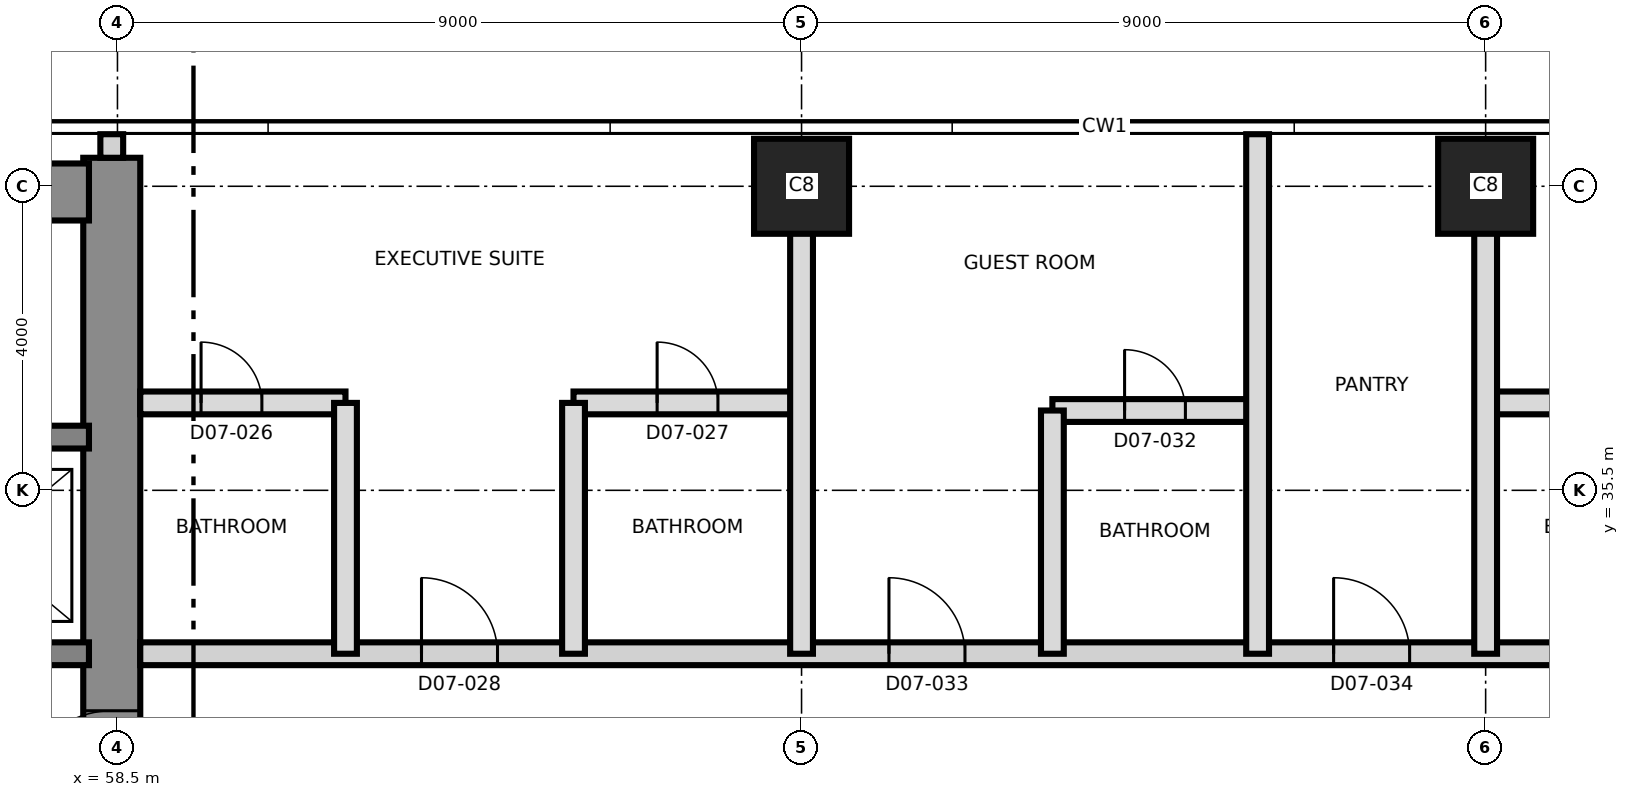
"""IFC4 building model, lengths in metres.
Left out: names, types, materials, properties, quantities, classifications, styles, units other than length and angle.
Written with IfcOpenShell. Run it as: python <this file> out.ifc"""

import sys

from ifc_helpers import new_model, si_unit, direction, frame, frame_2d, origin, origin_2d, place, context, subcontext, project, spatial, rectangle, extrude, element, fill, save


model = new_model("IFC4")
c1 = context("Model", 3, precision=1e-05, world=origin(), true_north=direction((0.0, 1.0)))
c2 = subcontext(c1, "Body", "Model", "MODEL_VIEW")
j1 = project(units=[si_unit("LENGTHUNIT", "METRE"), si_unit("PLANEANGLEUNIT", "RADIAN")], contexts=[c1])
p1 = place(None, origin())
s1 = spatial("IfcSite", under=j1, at=p1, CompositionType="ELEMENT")
p2 = place(p1, origin())
s2 = spatial("IfcBuilding", under=s1, at=p2, CompositionType="ELEMENT")
p3 = place(p2, frame((0.0, 0.0, 94.5)))
s3 = spatial("IfcBuildingStorey", under=s2, at=p3, CompositionType="ELEMENT", Elevation=94.5)
p4 = place(p3, frame((58.425, 21.125, 0.0), z_axis=(0.0, 0.0, 1.0), x_axis=(0.0, 1.0, 0.0)))
e1 = element("IfcWall", 1, at=p4, inside=s3, PredefinedType="SHEAR", context=c2, shape_type="SweptSolid", body=[
    extrude(rectangle(XDim=18.75, YDim=0.75, at=frame_2d((9.375, 0.0))), origin(), (0.0, 0.0, 1.0), 3.7),
])
p5 = place(p4, frame((10.275, 0.0, 0.0)))
e2 = element("IfcOpeningElement", 2, at=p5, cuts=e1, PredefinedType="OPENING", context=c2, shape_type="SweptSolid", body=[
    extrude(rectangle(XDim=1.2, YDim=2.1, at=frame_2d((0.6, 1.05))), frame((0.0, 0.385, 0.0), z_axis=(0.0, -1.0, 0.0), x_axis=(1.0, 0.0, 0.0)), (0.0, 0.0, 1.0), 0.77),
])
p6 = place(p3, frame((31.125, 39.425, 0.0), z_axis=(0.0, 0.0, 1.0), x_axis=(1.0, 0.0, 0.0)))
e3 = element("IfcWall", 3, at=p6, inside=s3, PredefinedType="SHEAR", context=c2, shape_type="SweptSolid", body=[
    extrude(rectangle(XDim=27.0, YDim=0.75, at=frame_2d((13.5, 0.0))), origin(), (0.0, 0.0, 1.0), 3.7),
])
p7 = place(p6, frame((10.575, 0.0, 0.0)))
e4 = element("IfcOpeningElement", 4, at=p7, cuts=e3, PredefinedType="OPENING", context=c2, shape_type="SweptSolid", body=[
    extrude(rectangle(XDim=1.2, YDim=2.1, at=frame_2d((0.6, 1.05))), frame((0.0, 0.385, 0.0), z_axis=(0.0, -1.0, 0.0), x_axis=(1.0, 0.0, 0.0)), (0.0, 0.0, 1.0), 0.77),
])
p8 = place(p3, frame((31.875, 33.35, 0.0), z_axis=(0.0, 0.0, 1.0), x_axis=(1.0, 0.0, 0.0)))
e5 = element("IfcWall", 5, at=p8, inside=s3, PredefinedType="SHEAR", context=c2, shape_type="SweptSolid", body=[
    extrude(rectangle(XDim=26.25, YDim=0.3, at=frame_2d((13.125, 0.0))), origin(), (0.0, 0.0, 1.0), 3.7),
])
p9 = place(p8, frame((13.775, 0.0, 0.0)))
e6 = element("IfcOpeningElement", 6, at=p9, cuts=e5, PredefinedType="OPENING", context=c2, shape_type="SweptSolid", body=[
    extrude(rectangle(XDim=1.4, YDim=2.1, at=frame_2d((0.7, 1.05))), frame((0.0, 0.16, 0.0), z_axis=(0.0, -1.0, 0.0), x_axis=(1.0, 0.0, 0.0)), (0.0, 0.0, 1.0), 0.32),
])
p10 = place(p8, frame((5.25, 0.0, 0.0)))
e7 = element("IfcOpeningElement", 7, at=p10, cuts=e5, PredefinedType="OPENING", context=c2, shape_type="SweptSolid", body=[
    extrude(rectangle(XDim=1.2, YDim=2.1, at=frame_2d((0.6, 1.05))), frame((0.0, 0.16, 0.0), z_axis=(0.0, -1.0, 0.0), x_axis=(1.0, 0.0, 0.0)), (0.0, 0.0, 1.0), 0.32),
])
p11 = place(p8, frame((19.8, 0.0, 0.0)))
e8 = element("IfcOpeningElement", 8, at=p11, cuts=e5, PredefinedType="OPENING", context=c2, shape_type="SweptSolid", body=[
    extrude(rectangle(XDim=1.2, YDim=2.1, at=frame_2d((0.6, 1.05))), frame((0.0, 0.16, 0.0), z_axis=(0.0, -1.0, 0.0), x_axis=(1.0, 0.0, 0.0)), (0.0, 0.0, 1.0), 0.32),
])
p12 = place(p3, frame((43.5, 36.2, 0.0), z_axis=(0.0, 0.0, 1.0), x_axis=(1.0, 0.0, 0.0)))
e9 = element("IfcWall", 9, at=p12, inside=s3, PredefinedType="SHEAR", context=c2, shape_type="SweptSolid", body=[
    extrude(rectangle(XDim=14.625, YDim=0.3, at=frame_2d((7.312, 0.0))), origin(), (0.0, 0.0, 1.0), 3.7),
])
p13 = place(p12, frame((6.9, 0.0, 0.0)))
e10 = element("IfcOpeningElement", 10, at=p13, cuts=e9, PredefinedType="OPENING", context=c2, shape_type="SweptSolid", body=[
    extrude(rectangle(XDim=1.2, YDim=2.1, at=frame_2d((0.6, 1.05))), frame((0.0, 0.16, 0.0), z_axis=(0.0, -1.0, 0.0), x_axis=(1.0, 0.0, 0.0)), (0.0, 0.0, 1.0), 0.32),
])
p14 = place(p12, frame((0.7, 0.0, 0.0)))
e11 = element("IfcOpeningElement", 11, at=p14, cuts=e9, PredefinedType="OPENING", context=c2, shape_type="SweptSolid", body=[
    extrude(rectangle(XDim=1.3, YDim=2.4, at=frame_2d((0.65, 1.2))), frame((0.0, 0.16, 0.0), z_axis=(0.0, -1.0, 0.0), x_axis=(1.0, 0.0, 0.0)), (0.0, 0.0, 1.0), 0.32),
])
p15 = place(p12, frame((3.7, 0.0, 0.0)))
e12 = element("IfcOpeningElement", 12, at=p15, cuts=e9, PredefinedType="OPENING", context=c2, shape_type="SweptSolid", body=[
    extrude(rectangle(XDim=1.3, YDim=2.4, at=frame_2d((0.65, 1.2))), frame((0.0, 0.16, 0.0), z_axis=(0.0, -1.0, 0.0), x_axis=(1.0, 0.0, 0.0)), (0.0, 0.0, 1.0), 0.32),
])
for number, where, z_axis, x_axis in (
    (13, (67.5, 39.5, 0.0), (0.0, 0.0, 1.0), (1.0, 0.0, 0.0)),
    (14, (76.5, 39.5, 0.0), (0.0, 0.0, 1.0), (1.0, 0.0, 0.0)),
):
    element("IfcColumn", number, at=place(p3, frame(where, z_axis=z_axis, x_axis=x_axis)), inside=s3, PredefinedType="COLUMN", context=c2, shape_type="SweptSolid", body=[
        extrude(rectangle(XDim=1.25, YDim=1.25, at=origin_2d()), origin(), (0.0, 0.0, 1.0), 3.7),
    ])
p16 = place(p3, frame((58.8, 33.35, 0.0), z_axis=(0.0, 0.0, 1.0), x_axis=(1.0, 0.0, 0.0)))
e15 = element("IfcWall", 15, at=p16, inside=s3, PredefinedType="PARTITIONING", context=c2, shape_type="SweptSolid", body=[
    extrude(rectangle(XDim=26.53, YDim=0.3, at=frame_2d((13.265, 0.0))), origin(), (0.0, 0.0, 1.0), 3.4),
])
p17 = place(p16, frame((3.7, 0.0, 0.0)))
e16 = element("IfcOpeningElement", 16, at=p17, cuts=e15, PredefinedType="OPENING", context=c2, shape_type="SweptSolid", body=[
    extrude(rectangle(XDim=1.0, YDim=2.4, at=frame_2d((0.5, 1.2))), frame((0.0, 0.16, 0.0), z_axis=(0.0, -1.0, 0.0), x_axis=(1.0, 0.0, 0.0)), (0.0, 0.0, 1.0), 0.32),
])
p18 = place(p16, frame((9.85, 0.0, 0.0)))
e17 = element("IfcOpeningElement", 17, at=p18, cuts=e15, PredefinedType="OPENING", context=c2, shape_type="SweptSolid", body=[
    extrude(rectangle(XDim=1.0, YDim=2.1, at=frame_2d((0.5, 1.05))), frame((0.0, 0.16, 0.0), z_axis=(0.0, -1.0, 0.0), x_axis=(1.0, 0.0, 0.0)), (0.0, 0.0, 1.0), 0.32),
])
p19 = place(p16, frame((15.7, 0.0, 0.0)))
e18 = element("IfcOpeningElement", 18, at=p19, cuts=e15, PredefinedType="OPENING", context=c2, shape_type="SweptSolid", body=[
    extrude(rectangle(XDim=1.0, YDim=2.1, at=frame_2d((0.5, 1.05))), frame((0.0, 0.16, 0.0), z_axis=(0.0, -1.0, 0.0), x_axis=(1.0, 0.0, 0.0)), (0.0, 0.0, 1.0), 0.32),
])
p20 = place(p16, frame((21.7, 0.0, 0.0)))
e19 = element("IfcOpeningElement", 19, at=p20, cuts=e15, PredefinedType="OPENING", context=c2, shape_type="SweptSolid", body=[
    extrude(rectangle(XDim=1.0, YDim=2.4, at=frame_2d((0.5, 1.2))), frame((0.0, 0.16, 0.0), z_axis=(0.0, -1.0, 0.0), x_axis=(1.0, 0.0, 0.0)), (0.0, 0.0, 1.0), 0.32),
])
p21 = place(p3, frame((70.8, 36.55, 0.0), z_axis=(0.0, 0.0, 1.0), x_axis=(1.0, 0.0, 0.0)))
e20 = element("IfcWall", 20, at=p21, inside=s3, PredefinedType="PARTITIONING", context=c2, shape_type="SweptSolid", body=[
    extrude(rectangle(XDim=2.7, YDim=0.3, at=frame_2d((1.35, 0.0))), origin(), (0.0, 0.0, 1.0), 3.4),
])
p22 = place(p21, frame((0.95, 0.0, 0.0)))
e21 = element("IfcOpeningElement", 21, at=p22, cuts=e20, PredefinedType="OPENING", context=c2, shape_type="SweptSolid", body=[
    extrude(rectangle(XDim=0.8, YDim=2.1, at=frame_2d((0.4, 1.05))), frame((0.0, 0.16, 0.0), z_axis=(0.0, -1.0, 0.0), x_axis=(1.0, 0.0, 0.0)), (0.0, 0.0, 1.0), 0.32),
])
p23 = place(p3, frame((58.8, 36.65, 0.0), z_axis=(0.0, 0.0, 1.0), x_axis=(1.0, 0.0, 0.0)))
e22 = element("IfcWall", 22, at=p23, inside=s3, PredefinedType="PARTITIONING", context=c2, shape_type="SweptSolid", body=[
    extrude(rectangle(XDim=2.7, YDim=0.3, at=frame_2d((1.35, 0.0))), origin(), (0.0, 0.0, 1.0), 3.4),
])
p24 = place(p23, frame((0.8, 0.0, 0.0)))
e23 = element("IfcOpeningElement", 23, at=p24, cuts=e22, PredefinedType="OPENING", context=c2, shape_type="SweptSolid", body=[
    extrude(rectangle(XDim=0.8, YDim=2.1, at=frame_2d((0.4, 1.05))), frame((0.0, 0.16, 0.0), z_axis=(0.0, -1.0, 0.0), x_axis=(1.0, 0.0, 0.0)), (0.0, 0.0, 1.0), 0.32),
])
p25 = place(p3, frame((64.5, 36.65, 0.0), z_axis=(0.0, 0.0, 1.0), x_axis=(1.0, 0.0, 0.0)))
e24 = element("IfcWall", 24, at=p25, inside=s3, PredefinedType="PARTITIONING", context=c2, shape_type="SweptSolid", body=[
    extrude(rectangle(XDim=3.0, YDim=0.3, at=frame_2d((1.5, 0.0))), origin(), (0.0, 0.0, 1.0), 3.4),
])
p26 = place(p25, frame((1.1, 0.0, 0.0)))
e25 = element("IfcOpeningElement", 25, at=p26, cuts=e24, PredefinedType="OPENING", context=c2, shape_type="SweptSolid", body=[
    extrude(rectangle(XDim=0.8, YDim=2.1, at=frame_2d((0.4, 1.05))), frame((0.0, 0.16, 0.0), z_axis=(0.0, -1.0, 0.0), x_axis=(1.0, 0.0, 0.0)), (0.0, 0.0, 1.0), 0.32),
])
p27 = place(p3, frame((76.5, 36.65, 0.0), z_axis=(0.0, 0.0, 1.0), x_axis=(1.0, 0.0, 0.0)))
e26 = element("IfcWall", 26, at=p27, inside=s3, PredefinedType="PARTITIONING", context=c2, shape_type="SweptSolid", body=[
    extrude(rectangle(XDim=3.0, YDim=0.3, at=frame_2d((1.5, 0.0))), origin(), (0.0, 0.0, 1.0), 3.4),
])
p28 = place(p27, frame((1.1, 0.0, 0.0)))
e27 = element("IfcOpeningElement", 27, at=p28, cuts=e26, PredefinedType="OPENING", context=c2, shape_type="SweptSolid", body=[
    extrude(rectangle(XDim=0.8, YDim=2.1, at=frame_2d((0.4, 1.05))), frame((0.0, 0.16, 0.0), z_axis=(0.0, -1.0, 0.0), x_axis=(1.0, 0.0, 0.0)), (0.0, 0.0, 1.0), 0.32),
])
for number, where, z_axis, x_axis in (
    (28, (61.5, 33.35, 0.0), (0.0, 0.0, 1.0), (0.0, 1.0, 0.0)),
    (29, (64.5, 33.35, 0.0), (0.0, 0.0, 1.0), (0.0, 1.0, 0.0)),
):
    element("IfcWall", number, at=place(p3, frame(where, z_axis=z_axis, x_axis=x_axis)), inside=s3, PredefinedType="PARTITIONING", context=c2, shape_type="SweptSolid", body=[
        extrude(rectangle(XDim=3.3, YDim=0.3, at=frame_2d((1.65, 0.0))), origin(), (0.0, 0.0, 1.0), 3.4),
    ])
p29 = place(p3, frame((67.5, 33.35, 0.0), z_axis=(0.0, 0.0, 1.0), x_axis=(0.0, 1.0, 0.0)))
e30 = element("IfcWall", 30, at=p29, inside=s3, PredefinedType="PARTITIONING", context=c2, shape_type="SweptSolid", body=[
    extrude(rectangle(XDim=6.655, YDim=0.3, at=frame_2d((3.327, 0.0))), origin(), (0.0, 0.0, 1.0), 3.35),
])
p30 = place(p3, frame((70.8, 33.35, 0.0), z_axis=(0.0, 0.0, 1.0), x_axis=(0.0, 1.0, 0.0)))
e31 = element("IfcWall", 31, at=p30, inside=s3, PredefinedType="PARTITIONING", context=c2, shape_type="SweptSolid", body=[
    extrude(rectangle(XDim=3.2, YDim=0.3, at=frame_2d((1.6, 0.0))), origin(), (0.0, 0.0, 1.0), 3.4),
])
p31 = place(p3, frame((73.5, 33.35, 0.0), z_axis=(0.0, 0.0, 1.0), x_axis=(0.0, 1.0, 0.0)))
e32 = element("IfcWall", 32, at=p31, inside=s3, PredefinedType="PARTITIONING", context=c2, shape_type="SweptSolid", body=[
    extrude(rectangle(XDim=6.835, YDim=0.3, at=frame_2d((3.417, 0.0))), origin(), (0.0, 0.0, 1.0), 3.35),
])
p32 = place(p3, frame((76.5, 33.35, 0.0), z_axis=(0.0, 0.0, 1.0), x_axis=(0.0, 1.0, 0.0)))
e33 = element("IfcWall", 33, at=p32, inside=s3, PredefinedType="PARTITIONING", context=c2, shape_type="SweptSolid", body=[
    extrude(rectangle(XDim=6.655, YDim=0.3, at=frame_2d((3.327, 0.0))), origin(), (0.0, 0.0, 1.0), 3.35),
])
p33 = place(p3, frame((58.425, 39.875, 0.0), z_axis=(0.0, 0.0, 1.0), x_axis=(0.0, 1.0, 0.0)))
e34 = element("IfcWall", 34, at=p33, inside=s3, PredefinedType="PARTITIONING", context=c2, shape_type="SweptSolid", body=[
    extrude(rectangle(XDim=0.31, YDim=0.3, at=frame_2d((0.155, 0.0))), origin(), (0.0, 0.0, 1.0), 3.4),
])
p34 = place(p5, origin())
e35 = element("IfcDoor", 35, at=p34, inside=s3, OperationType="SINGLE_SWING_LEFT", PredefinedType="DOOR", context=c2, shape_type="SweptSolid", body=[
    extrude(rectangle(XDim=1.2, YDim=2.1, at=frame_2d((0.6, 1.05))), frame((0.0, 0.025, 0.0), z_axis=(0.0, -1.0, 0.0), x_axis=(1.0, 0.0, 0.0)), (0.0, 0.0, 1.0), 0.05),
])
fill(e2, e35)
p35 = place(p24, origin())
e36 = element("IfcDoor", 36, at=p35, inside=s3, OperationType="SINGLE_SWING_LEFT", PredefinedType="DOOR", context=c2, shape_type="SweptSolid", body=[
    extrude(rectangle(XDim=0.8, YDim=2.1, at=frame_2d((0.4, 1.05))), frame((0.0, 0.025, 0.0), z_axis=(0.0, -1.0, 0.0), x_axis=(1.0, 0.0, 0.0)), (0.0, 0.0, 1.0), 0.05),
])
fill(e23, e36)
p36 = place(p26, origin())
e37 = element("IfcDoor", 37, at=p36, inside=s3, OperationType="SINGLE_SWING_RIGHT", PredefinedType="DOOR", context=c2, shape_type="SweptSolid", body=[
    extrude(rectangle(XDim=0.8, YDim=2.1, at=frame_2d((0.4, 1.05))), frame((0.0, 0.025, 0.0), z_axis=(0.0, -1.0, 0.0), x_axis=(1.0, 0.0, 0.0)), (0.0, 0.0, 1.0), 0.05),
])
fill(e25, e37)
p37 = place(p17, origin())
e38 = element("IfcDoor", 38, at=p37, inside=s3, OperationType="SINGLE_SWING_LEFT", PredefinedType="DOOR", context=c2, shape_type="SweptSolid", body=[
    extrude(rectangle(XDim=1.0, YDim=2.4, at=frame_2d((0.5, 1.2))), frame((0.0, 0.025, 0.0), z_axis=(0.0, -1.0, 0.0), x_axis=(1.0, 0.0, 0.0)), (0.0, 0.0, 1.0), 0.05),
])
fill(e16, e38)
p38 = place(p22, origin())
e39 = element("IfcDoor", 39, at=p38, inside=s3, OperationType="SINGLE_SWING_LEFT", PredefinedType="DOOR", context=c2, shape_type="SweptSolid", body=[
    extrude(rectangle(XDim=0.8, YDim=2.1, at=frame_2d((0.4, 1.05))), frame((0.0, 0.025, 0.0), z_axis=(0.0, -1.0, 0.0), x_axis=(1.0, 0.0, 0.0)), (0.0, 0.0, 1.0), 0.05),
])
fill(e21, e39)
p39 = place(p18, origin())
e40 = element("IfcDoor", 40, at=p39, inside=s3, OperationType="SINGLE_SWING_LEFT", PredefinedType="DOOR", context=c2, shape_type="SweptSolid", body=[
    extrude(rectangle(XDim=1.0, YDim=2.1, at=frame_2d((0.5, 1.05))), frame((0.0, 0.025, 0.0), z_axis=(0.0, -1.0, 0.0), x_axis=(1.0, 0.0, 0.0)), (0.0, 0.0, 1.0), 0.05),
])
fill(e17, e40)
p40 = place(p19, origin())
e41 = element("IfcDoor", 41, at=p40, inside=s3, OperationType="SINGLE_SWING_RIGHT", PredefinedType="DOOR", context=c2, shape_type="SweptSolid", body=[
    extrude(rectangle(XDim=1.0, YDim=2.1, at=frame_2d((0.5, 1.05))), frame((0.0, 0.025, 0.0), z_axis=(0.0, -1.0, 0.0), x_axis=(1.0, 0.0, 0.0)), (0.0, 0.0, 1.0), 0.05),
])
fill(e18, e41)
save(model, sys.argv[1])
